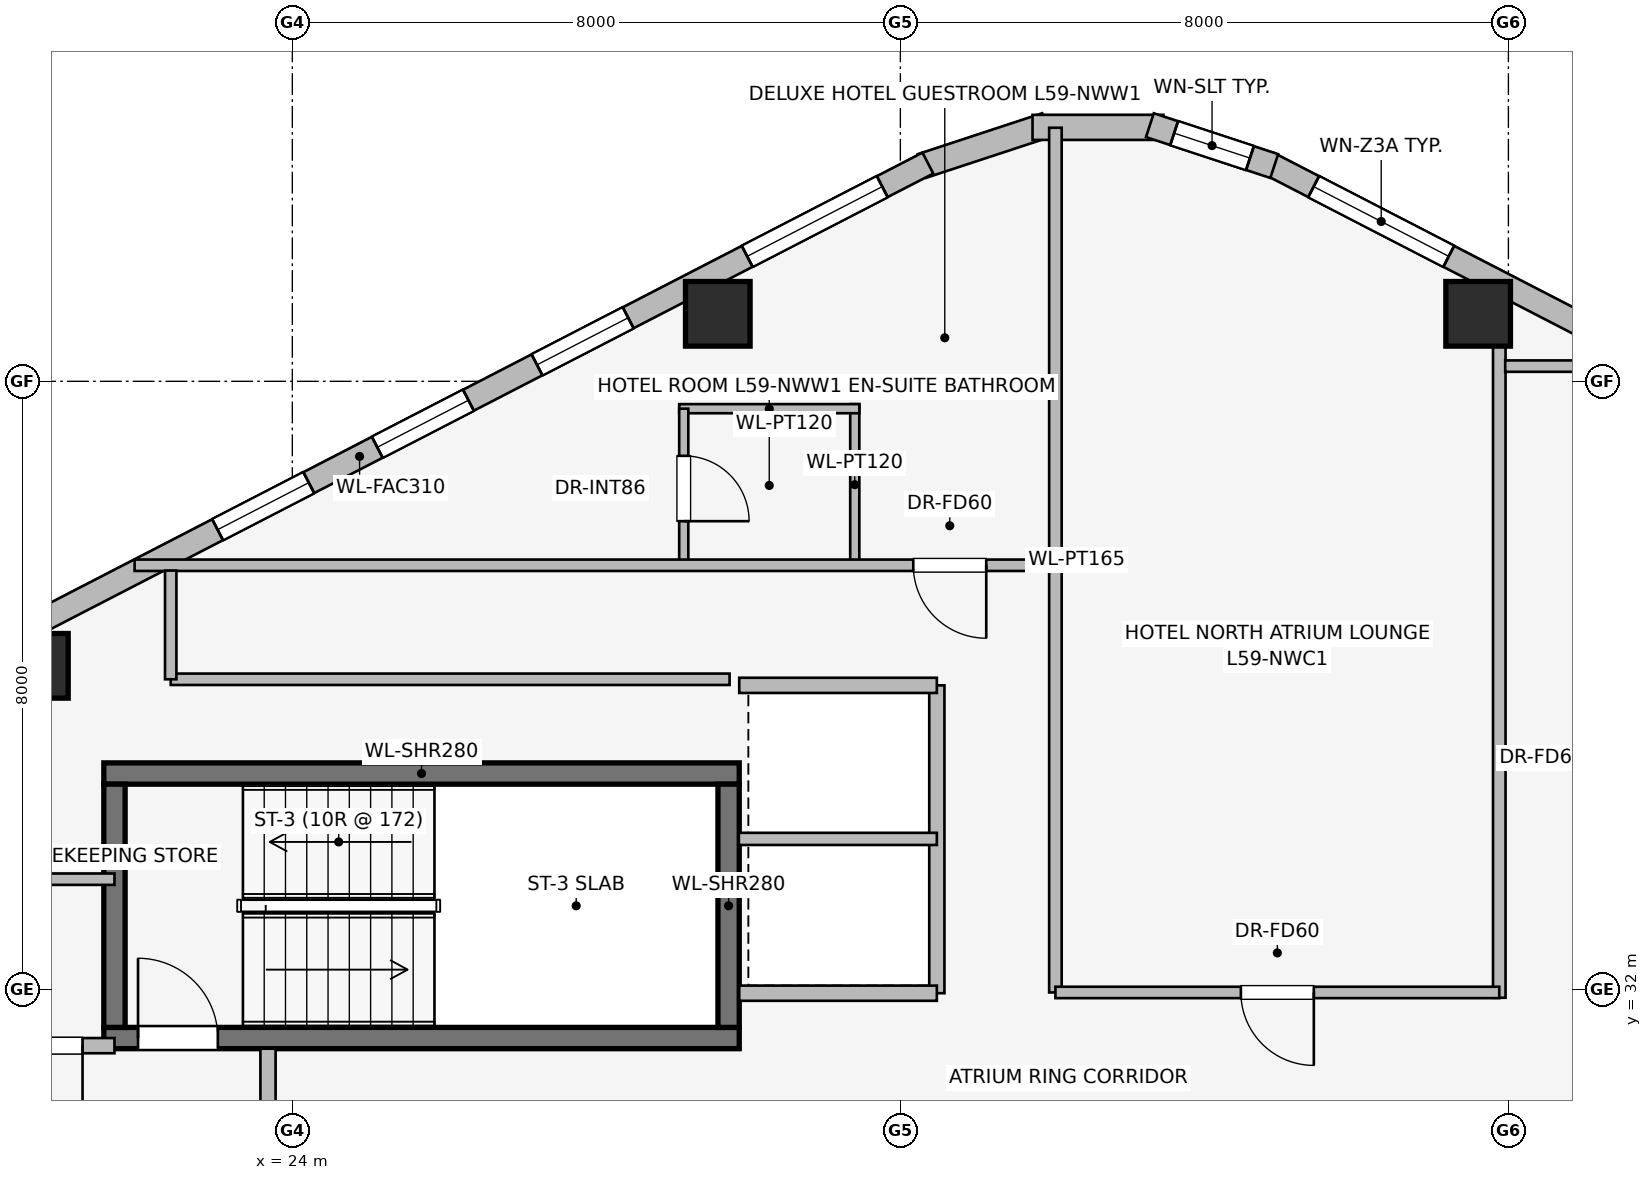
"""IFC4 building model, lengths in metres.
Left out: names, types, materials, properties, quantities, classifications, styles, units other than length and angle.
Written with IfcOpenShell. Run it as: python <this file> out.ifc"""

import sys

from ifc_helpers import new_model, si_unit, direction, frame, frame_2d, origin, origin_2d, place, context, subcontext, project, spatial, rectangle, extrude, element, fill, save


model = new_model("IFC4")
c1 = context("Model", 3, precision=1e-05, world=origin(), true_north=direction((0.0, 1.0)))
c2 = subcontext(c1, "Body", "Model", "MODEL_VIEW")
j1 = project(units=[si_unit("LENGTHUNIT", "METRE"), si_unit("PLANEANGLEUNIT", "RADIAN")], contexts=[c1])
p1 = place(None, origin())
s1 = spatial("IfcSite", under=j1, at=p1, CompositionType="ELEMENT")
p2 = place(p1, origin())
s2 = spatial("IfcBuilding", under=s1, at=p2, CompositionType="ELEMENT")
p3 = place(p2, frame((0.0, 0.0, 217.15)))
s3 = spatial("IfcBuildingStorey", under=s2, at=p3, CompositionType="ELEMENT", Elevation=217.15)
p4 = place(p3, frame((21.52, 31.36, 0.0), z_axis=(0.0, 0.0, 1.0), x_axis=(1.0, 0.0, 0.0)))
e1 = element("IfcWall", 1, at=p4, inside=s3, PredefinedType="SHEAR", context=c2, shape_type="SweptSolid", body=[
    extrude(rectangle(XDim=8.36, YDim=0.28, at=frame_2d((4.18, 0.0))), origin(), (0.0, 0.0, 1.0), 3.45),
])
p5 = place(p4, frame((0.45, 0.0, 0.0)))
e2 = element("IfcOpeningElement", 2, at=p5, cuts=e1, PredefinedType="OPENING", context=c2, shape_type="SweptSolid", body=[
    extrude(rectangle(XDim=1.05, YDim=2.0, at=frame_2d((0.525, 1.0))), frame((0.0, 0.15, 0.0), z_axis=(0.0, -1.0, 0.0), x_axis=(1.0, 0.0, 0.0)), (0.0, 0.0, 1.0), 0.3),
])
p6 = place(p3, frame((29.88, 34.84, 0.0), z_axis=(0.0, 0.0, 1.0), x_axis=(-1.0, 0.0, 0.0)))
e3 = element("IfcWall", 3, at=p6, inside=s3, PredefinedType="SHEAR", context=c2, shape_type="SweptSolid", body=[
    extrude(rectangle(XDim=8.36, YDim=0.28, at=frame_2d((4.18, 0.0))), origin(), (0.0, 0.0, 1.0), 3.45),
])
for number, where, z_axis, x_axis in (
    (4, (21.66, 34.7, 0.0), (0.0, 0.0, 1.0), (0.0, -1.0, 0.0)),
    (5, (29.74, 31.5, 0.0), (0.0, 0.0, 1.0), (0.0, 1.0, 0.0)),
):
    element("IfcWall", number, at=place(p3, frame(where, z_axis=z_axis, x_axis=x_axis)), inside=s3, PredefinedType="SHEAR", context=c2, shape_type="SweptSolid", body=[
        extrude(rectangle(XDim=3.2, YDim=0.28, at=frame_2d((1.6, 0.0))), origin(), (0.0, 0.0, 1.0), 3.45),
    ])
for number, where, z_axis, x_axis in (
    (6, (39.602, 40.888, 0.0), (0.0, 0.0, 1.0), (1.0, 0.0, 0.0)),
    (7, (29.598, 40.888, 0.0), (0.0, 0.0, 1.0), (1.0, 0.0, 0.0)),
    (8, (20.626, 36.257, 0.0), (0.0, 0.0, 1.0), (1.0, 0.0, 0.0)),
):
    element("IfcColumn", number, at=place(p3, frame(where, z_axis=z_axis, x_axis=x_axis)), inside=s3, PredefinedType="COLUMN", context=c2, shape_type="SweptSolid", body=[
        extrude(rectangle(XDim=0.85, YDim=0.85, at=origin_2d()), origin(), (0.0, 0.0, 1.0), 3.45),
    ])
p7 = place(p3, frame((36.838, 42.871, 0.0), z_axis=(0.0, 0.0, 1.0), x_axis=(0.888626188278, -0.458632202867, 0.0)))
e9 = element("IfcWall", 9, at=p7, inside=s3, PredefinedType="STANDARD", context=c2, shape_type="SweptSolid", body=[
    extrude(rectangle(XDim=16.828, YDim=0.31, at=frame_2d((8.414, 0.0))), origin(), (0.0, 0.0, 1.0), 3.03),
])
p8 = place(p7, frame((0.675, 0.0, 0.75)))
e10 = element("IfcOpeningElement", 10, at=p8, cuts=e9, PredefinedType="OPENING", context=c2, shape_type="SweptSolid", body=[
    extrude(rectangle(XDim=2.0, YDim=1.5, at=frame_2d((1.0, 0.75))), frame((0.0, 0.165, 0.0), z_axis=(0.0, -1.0, 0.0), x_axis=(1.0, 0.0, 0.0)), (0.0, 0.0, 1.0), 0.33),
])
p9 = place(p7, frame((6.273, 0.0, 0.75)))
e11 = element("IfcOpeningElement", 11, at=p9, cuts=e9, PredefinedType="OPENING", context=c2, shape_type="SweptSolid", body=[
    extrude(rectangle(XDim=1.35, YDim=1.45, at=frame_2d((0.675, 0.725))), frame((0.0, 0.165, 0.0), z_axis=(0.0, -1.0, 0.0), x_axis=(1.0, 0.0, 0.0)), (0.0, 0.0, 1.0), 0.33),
])
p10 = place(p7, frame((8.653, 0.0, 0.75)))
e12 = element("IfcOpeningElement", 12, at=p10, cuts=e9, PredefinedType="OPENING", context=c2, shape_type="SweptSolid", body=[
    extrude(rectangle(XDim=1.35, YDim=1.45, at=frame_2d((0.675, 0.725))), frame((0.0, 0.165, 0.0), z_axis=(0.0, -1.0, 0.0), x_axis=(1.0, 0.0, 0.0)), (0.0, 0.0, 1.0), 0.33),
])
p11 = place(p7, frame((11.032, 0.0, 0.75)))
e13 = element("IfcOpeningElement", 13, at=p11, cuts=e9, PredefinedType="OPENING", context=c2, shape_type="SweptSolid", body=[
    extrude(rectangle(XDim=1.35, YDim=1.45, at=frame_2d((0.675, 0.725))), frame((0.0, 0.165, 0.0), z_axis=(0.0, -1.0, 0.0), x_axis=(1.0, 0.0, 0.0)), (0.0, 0.0, 1.0), 0.33),
])
p12 = place(p7, frame((14.153, 0.0, 0.75)))
e14 = element("IfcOpeningElement", 14, at=p12, cuts=e9, PredefinedType="OPENING", context=c2, shape_type="SweptSolid", body=[
    extrude(rectangle(XDim=2.0, YDim=1.5, at=frame_2d((1.0, 0.75))), frame((0.0, 0.165, 0.0), z_axis=(0.0, -1.0, 0.0), x_axis=(1.0, 0.0, 0.0)), (0.0, 0.0, 1.0), 0.33),
])
p13 = place(p3, frame((32.281, 42.832, 0.0), z_axis=(0.0, 0.0, 1.0), x_axis=(0.949937416267, 0.312440242569, 0.0)))
e15 = element("IfcWall", 15, at=p13, inside=s3, PredefinedType="STANDARD", context=c2, shape_type="SweptSolid", body=[
    extrude(rectangle(XDim=1.722, YDim=0.33, at=frame_2d((0.861, 0.0))), origin(), (0.0, 0.0, 1.0), 3.03),
])
p14 = place(p3, frame((33.739, 43.341, 0.0), z_axis=(0.0, 0.0, 1.0), x_axis=(1.0, 0.0, 0.0)))
e16 = element("IfcWall", 16, at=p14, inside=s3, PredefinedType="STANDARD", context=c2, shape_type="SweptSolid", body=[
    extrude(rectangle(XDim=1.722, YDim=0.33, at=frame_2d((0.861, 0.0))), origin(), (0.0, 0.0, 1.0), 3.03),
])
p15 = place(p3, frame((35.283, 43.37, 0.0), z_axis=(0.0, 0.0, 1.0), x_axis=(0.949937416267, -0.312440242569, 0.0)))
e17 = element("IfcWall", 17, at=p15, inside=s3, PredefinedType="STANDARD", context=c2, shape_type="SweptSolid", body=[
    extrude(rectangle(XDim=1.722, YDim=0.33, at=frame_2d((0.861, 0.0))), origin(), (0.0, 0.0, 1.0), 3.03),
])
p16 = place(p15, frame((0.336, 0.0, 0.75)))
e18 = element("IfcOpeningElement", 18, at=p16, cuts=e17, PredefinedType="OPENING", context=c2, shape_type="SweptSolid", body=[
    extrude(rectangle(XDim=1.05, YDim=1.4, at=frame_2d((0.525, 0.7))), frame((0.0, 0.175, 0.0), z_axis=(0.0, -1.0, 0.0), x_axis=(1.0, 0.0, 0.0)), (0.0, 0.0, 1.0), 0.35),
])
p17 = place(p3, frame((17.408, 35.153, 0.0), z_axis=(0.0, 0.0, 1.0), x_axis=(0.888626188278, 0.458632202867, 0.0)))
e19 = element("IfcWall", 19, at=p17, inside=s3, PredefinedType="STANDARD", context=c2, shape_type="SweptSolid", body=[
    extrude(rectangle(XDim=16.828, YDim=0.31, at=frame_2d((8.414, 0.0))), origin(), (0.0, 0.0, 1.0), 3.03),
])
p18 = place(p17, frame((0.675, 0.0, 0.75)))
e20 = element("IfcOpeningElement", 20, at=p18, cuts=e19, PredefinedType="OPENING", context=c2, shape_type="SweptSolid", body=[
    extrude(rectangle(XDim=2.0, YDim=1.5, at=frame_2d((1.0, 0.75))), frame((0.0, 0.165, 0.0), z_axis=(0.0, -1.0, 0.0), x_axis=(1.0, 0.0, 0.0)), (0.0, 0.0, 1.0), 0.33),
])
p19 = place(p17, frame((6.312, 0.0, 0.75)))
e21 = element("IfcOpeningElement", 21, at=p19, cuts=e19, PredefinedType="OPENING", context=c2, shape_type="SweptSolid", body=[
    extrude(rectangle(XDim=1.35, YDim=1.45, at=frame_2d((0.675, 0.725))), frame((0.0, 0.165, 0.0), z_axis=(0.0, -1.0, 0.0), x_axis=(1.0, 0.0, 0.0)), (0.0, 0.0, 1.0), 0.33),
])
p20 = place(p17, frame((8.676, 0.0, 0.75)))
e22 = element("IfcOpeningElement", 22, at=p20, cuts=e19, PredefinedType="OPENING", context=c2, shape_type="SweptSolid", body=[
    extrude(rectangle(XDim=1.35, YDim=1.45, at=frame_2d((0.675, 0.725))), frame((0.0, 0.165, 0.0), z_axis=(0.0, -1.0, 0.0), x_axis=(1.0, 0.0, 0.0)), (0.0, 0.0, 1.0), 0.33),
])
p21 = place(p17, frame((11.041, 0.0, 0.75)))
e23 = element("IfcOpeningElement", 23, at=p21, cuts=e19, PredefinedType="OPENING", context=c2, shape_type="SweptSolid", body=[
    extrude(rectangle(XDim=1.35, YDim=1.45, at=frame_2d((0.675, 0.725))), frame((0.0, 0.165, 0.0), z_axis=(0.0, -1.0, 0.0), x_axis=(1.0, 0.0, 0.0)), (0.0, 0.0, 1.0), 0.33),
])
p22 = place(p17, frame((14.153, 0.0, 0.75)))
e24 = element("IfcOpeningElement", 24, at=p22, cuts=e19, PredefinedType="OPENING", context=c2, shape_type="SweptSolid", body=[
    extrude(rectangle(XDim=2.0, YDim=1.5, at=frame_2d((1.0, 0.75))), frame((0.0, 0.165, 0.0), z_axis=(0.0, -1.0, 0.0), x_axis=(1.0, 0.0, 0.0)), (0.0, 0.0, 1.0), 0.33),
])
p23 = place(p3, frame((23.68, 25.68, 0.0), z_axis=(0.0, 0.0, 1.0), x_axis=(0.0, 1.0, 0.0)))
e25 = element("IfcWall", 25, at=p23, inside=s3, PredefinedType="PARTITIONING", context=c2, shape_type="SweptSolid", body=[
    extrude(rectangle(XDim=5.54, YDim=0.2, at=frame_2d((2.77, 0.0))), origin(), (0.0, 0.0, 1.0), 3.03),
])
p24 = place(p23, frame((1.8, 0.0, 0.0)))
e26 = element("IfcOpeningElement", 26, at=p24, cuts=e25, PredefinedType="OPENING", context=c2, shape_type="SweptSolid", body=[
    extrude(rectangle(XDim=1.05, YDim=2.0, at=frame_2d((0.525, 1.0))), frame((0.0, 0.11, 0.0), z_axis=(0.0, -1.0, 0.0), x_axis=(1.0, 0.0, 0.0)), (0.0, 0.0, 1.0), 0.22),
])
p25 = place(p3, frame((21.66, 31.26, 0.0), z_axis=(0.0, 0.0, 1.0), x_axis=(-1.0, 0.0, 0.0)))
e27 = element("IfcWall", 27, at=p25, inside=s3, PredefinedType="PARTITIONING", context=c2, shape_type="SweptSolid", body=[
    extrude(rectangle(XDim=2.01, YDim=0.2, at=frame_2d((1.005, 0.0))), origin(), (0.0, 0.0, 1.0), 3.03),
])
p26 = place(p25, frame((0.42, 0.0, 0.0)))
e28 = element("IfcOpeningElement", 28, at=p26, cuts=e27, PredefinedType="OPENING", context=c2, shape_type="SweptSolid", body=[
    extrude(rectangle(XDim=0.86, YDim=2.0, at=frame_2d((0.43, 1.0))), frame((0.0, 0.11, 0.0), z_axis=(0.0, -1.0, 0.0), x_axis=(1.0, 0.0, 0.0)), (0.0, 0.0, 1.0), 0.22),
])
p27 = place(p3, frame((32.48, 31.95, 0.0), z_axis=(0.0, 0.0, 1.0), x_axis=(0.0, 1.0, 0.0)))
e29 = element("IfcWall", 29, at=p27, inside=s3, PredefinedType="PARTITIONING", context=c2, shape_type="SweptSolid", body=[
    extrude(rectangle(XDim=4.05, YDim=0.2, at=frame_2d((2.025, 0.0))), origin(), (0.0, 0.0, 1.0), 3.03),
])
for number, where, z_axis, x_axis in (
    (30, (29.88, 36.0, 0.0), (0.0, 0.0, 1.0), (1.0, 0.0, 0.0)),
    (31, (32.48, 31.95, 0.0), (0.0, 0.0, 1.0), (-1.0, 0.0, 0.0)),
):
    element("IfcWall", number, at=place(p3, frame(where, z_axis=z_axis, x_axis=x_axis)), inside=s3, PredefinedType="PARTITIONING", context=c2, shape_type="SweptSolid", body=[
        extrude(rectangle(XDim=2.6, YDim=0.2, at=frame_2d((1.3, 0.0))), origin(), (0.0, 0.0, 1.0), 3.03),
    ])
p28 = place(p3, frame((29.875, 33.98, 0.0), z_axis=(0.0, 0.0, 1.0), x_axis=(1.0, 0.0, 0.0)))
e32 = element("IfcWall", 32, at=p28, inside=s3, PredefinedType="PARTITIONING", context=c2, shape_type="SweptSolid", body=[
    extrude(rectangle(XDim=2.605, YDim=0.16, at=frame_2d((1.302, 0.0))), origin(), (0.0, 0.0, 1.0), 2.422),
])
p29 = place(p3, frame((21.66, 33.45, 0.0), z_axis=(0.0, 0.0, 1.0), x_axis=(-1.0, 0.0, 0.0)))
e33 = element("IfcWall", 33, at=p29, inside=s3, PredefinedType="PARTITIONING", context=c2, shape_type="SweptSolid", body=[
    extrude(rectangle(XDim=1.81, YDim=0.15, at=frame_2d((0.905, 0.0))), origin(), (0.0, 0.0, 1.0), 3.03),
])
p30 = place(p3, frame((31.4, 37.58, 0.0), z_axis=(0.0, 0.0, 1.0), x_axis=(0.0, 1.0, 0.0)))
e34 = element("IfcWall", 34, at=p30, inside=s3, PredefinedType="PARTITIONING", context=c2, shape_type="SweptSolid", body=[
    extrude(rectangle(XDim=2.12, YDim=0.12, at=frame_2d((1.06, 0.0))), origin(), (0.0, 0.0, 1.0), 3.03),
])
p31 = place(p3, frame((31.46, 39.64, 0.0), z_axis=(0.0, 0.0, 1.0), x_axis=(-1.0, 0.0, 0.0)))
e35 = element("IfcWall", 35, at=p31, inside=s3, PredefinedType="PARTITIONING", context=c2, shape_type="SweptSolid", body=[
    extrude(rectangle(XDim=2.37, YDim=0.12, at=frame_2d((1.185, 0.0))), origin(), (0.0, 0.0, 1.0), 3.03),
])
p32 = place(p3, frame((29.15, 39.64, 0.0), z_axis=(0.0, 0.0, 1.0), x_axis=(0.0, -1.0, 0.0)))
e36 = element("IfcWall", 36, at=p32, inside=s3, PredefinedType="PARTITIONING", context=c2, shape_type="SweptSolid", body=[
    extrude(rectangle(XDim=2.06, YDim=0.12, at=frame_2d((1.03, 0.0))), origin(), (0.0, 0.0, 1.0), 3.03),
])
p33 = place(p32, frame((0.62, 0.0, 0.0)))
e37 = element("IfcOpeningElement", 37, at=p33, cuts=e36, PredefinedType="OPENING", context=c2, shape_type="SweptSolid", body=[
    extrude(rectangle(XDim=0.86, YDim=2.0, at=frame_2d((0.43, 1.0))), frame((0.0, 0.07, 0.0), z_axis=(0.0, -1.0, 0.0), x_axis=(1.0, 0.0, 0.0)), (0.0, 0.0, 1.0), 0.14),
])
p34 = place(p3, frame((34.0, 37.58, 0.0), z_axis=(0.0, 0.0, 1.0), x_axis=(-1.0, 0.0, 0.0)))
e38 = element("IfcWall", 38, at=p34, inside=s3, PredefinedType="PARTITIONING", context=c2, shape_type="SweptSolid", body=[
    extrude(rectangle(XDim=12.075, YDim=0.15, at=frame_2d((6.038, 0.0))), origin(), (0.0, 0.0, 1.0), 3.03),
])
p35 = place(p34, frame((0.87, 0.0, 0.0)))
e39 = element("IfcOpeningElement", 39, at=p35, cuts=e38, PredefinedType="OPENING", context=c2, shape_type="SweptSolid", body=[
    extrude(rectangle(XDim=0.96, YDim=2.0, at=frame_2d((0.48, 1.0))), frame((0.0, 0.085, 0.0), z_axis=(0.0, -1.0, 0.0), x_axis=(1.0, 0.0, 0.0)), (0.0, 0.0, 1.0), 0.17),
])
p36 = place(p3, frame((34.04, 31.96, 0.0), z_axis=(0.0, 0.0, 1.0), x_axis=(0.0, 1.0, 0.0)))
e40 = element("IfcWall", 40, at=p36, inside=s3, PredefinedType="PARTITIONING", context=c2, shape_type="SweptSolid", body=[
    extrude(rectangle(XDim=11.376, YDim=0.165, at=frame_2d((5.688, 0.0))), origin(), (0.0, 0.0, 1.0), 3.03),
])
p37 = place(p3, frame((39.88, 31.89, 0.0), z_axis=(0.0, 0.0, 1.0), x_axis=(0.0, 1.0, 0.0)))
e41 = element("IfcWall", 41, at=p37, inside=s3, PredefinedType="PARTITIONING", context=c2, shape_type="SweptSolid", body=[
    extrude(rectangle(XDim=9.406, YDim=0.165, at=frame_2d((4.703, 0.0))), origin(), (0.0, 0.0, 1.0), 2.022),
])
p38 = place(p3, frame((39.88, 31.96, 0.0), z_axis=(0.0, 0.0, 1.0), x_axis=(-1.0, 0.0, 0.0)))
e42 = element("IfcWall", 42, at=p38, inside=s3, PredefinedType="PARTITIONING", context=c2, shape_type="SweptSolid", body=[
    extrude(rectangle(XDim=5.84, YDim=0.15, at=frame_2d((2.92, 0.0))), origin(), (0.0, 0.0, 1.0), 3.03),
])
p39 = place(p38, frame((2.44, 0.0, 0.0)))
e43 = element("IfcOpeningElement", 43, at=p39, cuts=e42, PredefinedType="OPENING", context=c2, shape_type="SweptSolid", body=[
    extrude(rectangle(XDim=0.96, YDim=2.0, at=frame_2d((0.48, 1.0))), frame((0.0, 0.085, 0.0), z_axis=(0.0, -1.0, 0.0), x_axis=(1.0, 0.0, 0.0)), (0.0, 0.0, 1.0), 0.17),
])
p40 = place(p3, frame((29.753, 36.08, 0.0), z_axis=(0.0, 0.0, 1.0), x_axis=(-1.0, 0.0, 0.0)))
e44 = element("IfcWall", 44, at=p40, inside=s3, PredefinedType="PARTITIONING", context=c2, shape_type="SweptSolid", body=[
    extrude(rectangle(XDim=7.353, YDim=0.15, at=frame_2d((3.677, 0.0))), origin(), (0.0, 0.0, 1.0), 3.03),
])
p41 = place(p3, frame((22.4, 36.08, 0.0), z_axis=(0.0, 0.0, 1.0), x_axis=(0.0, 1.0, 0.0)))
e45 = element("IfcWall", 45, at=p41, inside=s3, PredefinedType="PARTITIONING", context=c2, shape_type="SweptSolid", body=[
    extrude(rectangle(XDim=1.43, YDim=0.15, at=frame_2d((0.715, 0.0))), origin(), (0.0, 0.0, 1.0), 3.03),
])
p42 = place(p3, frame((39.958, 40.2, 0.0), z_axis=(0.0, 0.0, 1.0), x_axis=(1.0, 0.0, 0.0)))
e46 = element("IfcWall", 46, at=p42, inside=s3, PredefinedType="PARTITIONING", context=c2, shape_type="SweptSolid", body=[
    extrude(rectangle(XDim=1.512, YDim=0.15, at=frame_2d((0.756, 0.0))), origin(), (0.0, 0.0, 1.0), 3.03),
])
p43 = place(p8, origin())
e47 = element("IfcWindow", 47, at=p43, inside=s3, PartitioningType="SINGLE_PANEL", PredefinedType="WINDOW", context=c2, shape_type="SweptSolid", body=[
    extrude(rectangle(XDim=2.0, YDim=1.5, at=frame_2d((1.0, 0.75))), frame((0.0, 0.03, 0.0), z_axis=(0.0, -1.0, 0.0), x_axis=(1.0, 0.0, 0.0)), (0.0, 0.0, 1.0), 0.06),
])
fill(e10, e47)
p44 = place(p16, origin())
e48 = element("IfcWindow", 48, at=p44, inside=s3, PartitioningType="SINGLE_PANEL", PredefinedType="WINDOW", context=c2, shape_type="SweptSolid", body=[
    extrude(rectangle(XDim=1.05, YDim=1.4, at=frame_2d((0.525, 0.7))), frame((0.0, 0.03, 0.0), z_axis=(0.0, -1.0, 0.0), x_axis=(1.0, 0.0, 0.0)), (0.0, 0.0, 1.0), 0.06),
])
fill(e18, e48)
p45 = place(p19, origin())
e49 = element("IfcWindow", 49, at=p45, inside=s3, PartitioningType="SINGLE_PANEL", PredefinedType="WINDOW", context=c2, shape_type="SweptSolid", body=[
    extrude(rectangle(XDim=1.35, YDim=1.45, at=frame_2d((0.675, 0.725))), frame((0.0, 0.03, 0.0), z_axis=(0.0, -1.0, 0.0), x_axis=(1.0, 0.0, 0.0)), (0.0, 0.0, 1.0), 0.06),
])
fill(e21, e49)
p46 = place(p20, origin())
e50 = element("IfcWindow", 50, at=p46, inside=s3, PartitioningType="SINGLE_PANEL", PredefinedType="WINDOW", context=c2, shape_type="SweptSolid", body=[
    extrude(rectangle(XDim=1.35, YDim=1.45, at=frame_2d((0.675, 0.725))), frame((0.0, 0.03, 0.0), z_axis=(0.0, -1.0, 0.0), x_axis=(1.0, 0.0, 0.0)), (0.0, 0.0, 1.0), 0.06),
])
fill(e22, e50)
p47 = place(p21, origin())
e51 = element("IfcWindow", 51, at=p47, inside=s3, PartitioningType="SINGLE_PANEL", PredefinedType="WINDOW", context=c2, shape_type="SweptSolid", body=[
    extrude(rectangle(XDim=1.35, YDim=1.45, at=frame_2d((0.675, 0.725))), frame((0.0, 0.03, 0.0), z_axis=(0.0, -1.0, 0.0), x_axis=(1.0, 0.0, 0.0)), (0.0, 0.0, 1.0), 0.06),
])
fill(e23, e51)
p48 = place(p22, origin())
e52 = element("IfcWindow", 52, at=p48, inside=s3, PartitioningType="SINGLE_PANEL", PredefinedType="WINDOW", context=c2, shape_type="SweptSolid", body=[
    extrude(rectangle(XDim=2.0, YDim=1.5, at=frame_2d((1.0, 0.75))), frame((0.0, 0.03, 0.0), z_axis=(0.0, -1.0, 0.0), x_axis=(1.0, 0.0, 0.0)), (0.0, 0.0, 1.0), 0.06),
])
fill(e24, e52)
p49 = place(p5, origin())
e53 = element("IfcDoor", 53, at=p49, inside=s3, OperationType="SINGLE_SWING_LEFT", PredefinedType="DOOR", context=c2, shape_type="SweptSolid", body=[
    extrude(rectangle(XDim=1.05, YDim=2.0, at=frame_2d((0.525, 1.0))), frame((0.0, 0.025, 0.0), z_axis=(0.0, -1.0, 0.0), x_axis=(1.0, 0.0, 0.0)), (0.0, 0.0, 1.0), 0.05),
])
fill(e2, e53)
p50 = place(p26, origin())
e54 = element("IfcDoor", 54, at=p50, inside=s3, OperationType="SINGLE_SWING_LEFT", PredefinedType="DOOR", context=c2, shape_type="SweptSolid", body=[
    extrude(rectangle(XDim=0.86, YDim=2.0, at=frame_2d((0.43, 1.0))), frame((0.0, 0.025, 0.0), z_axis=(0.0, -1.0, 0.0), x_axis=(1.0, 0.0, 0.0)), (0.0, 0.0, 1.0), 0.05),
])
fill(e28, e54)
p51 = place(p33, origin())
e55 = element("IfcDoor", 55, at=p51, inside=s3, OperationType="SINGLE_SWING_RIGHT", PredefinedType="DOOR", context=c2, shape_type="SweptSolid", body=[
    extrude(rectangle(XDim=0.86, YDim=2.0, at=frame_2d((0.43, 1.0))), frame((0.0, 0.025, 0.0), z_axis=(0.0, -1.0, 0.0), x_axis=(1.0, 0.0, 0.0)), (0.0, 0.0, 1.0), 0.05),
])
fill(e37, e55)
p52 = place(p35, origin())
e56 = element("IfcDoor", 56, at=p52, inside=s3, OperationType="SINGLE_SWING_LEFT", PredefinedType="DOOR", context=c2, shape_type="SweptSolid", body=[
    extrude(rectangle(XDim=0.96, YDim=2.0, at=frame_2d((0.48, 1.0))), frame((0.0, 0.025, 0.0), z_axis=(0.0, -1.0, 0.0), x_axis=(1.0, 0.0, 0.0)), (0.0, 0.0, 1.0), 0.05),
])
fill(e39, e56)
p53 = place(p39, origin())
e57 = element("IfcDoor", 57, at=p53, inside=s3, OperationType="SINGLE_SWING_LEFT", PredefinedType="DOOR", context=c2, shape_type="SweptSolid", body=[
    extrude(rectangle(XDim=0.96, YDim=2.0, at=frame_2d((0.48, 1.0))), frame((0.0, 0.025, 0.0), z_axis=(0.0, -1.0, 0.0), x_axis=(1.0, 0.0, 0.0)), (0.0, 0.0, 1.0), 0.05),
])
fill(e43, e57)
save(model, sys.argv[1])
